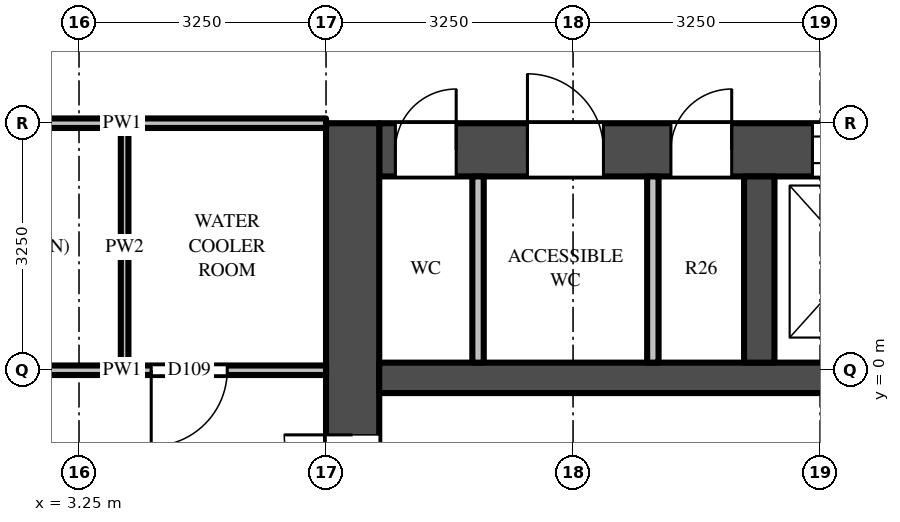
"""IFC4 building model, lengths in metres.
Left out: names, types, materials, properties, quantities, classifications, styles, units other than length and angle.
Written with IfcOpenShell. Run it as: python <this file> out.ifc"""

import sys

from ifc_helpers import new_model, si_unit, direction, frame, frame_2d, origin, place, context, subcontext, project, spatial, rectangle, extrude, source, transform, mapped, element, fill, save


model = new_model("IFC4")
c1 = context("Model", 3, precision=1e-05, world=origin(), true_north=direction((0.0, 1.0)))
c2 = subcontext(c1, "Body", "Model", "MODEL_VIEW")
j1 = project(units=[si_unit("LENGTHUNIT", "METRE"), si_unit("PLANEANGLEUNIT", "RADIAN")], contexts=[c1])
p1 = place(None, origin())
s1 = spatial("IfcSite", under=j1, at=p1, CompositionType="ELEMENT")
p2 = place(p1, origin())
s2 = spatial("IfcBuilding", under=s1, at=p2, CompositionType="ELEMENT")
p3 = place(p2, frame((0.0, 0.0, 302.8)))
s3 = spatial("IfcBuildingStorey", under=s2, at=p3, CompositionType="ELEMENT", Elevation=302.8)
m1 = source(origin(), c2, "Body", "SweptSolid", [
    extrude(rectangle(XDim=14.85, YDim=0.7, at=frame_2d((7.425, 0.0))), origin(), (0.0, 0.0, 1.0), 3.7),
])
p4 = place(p3, frame((7.2, 2.9, 0.0), z_axis=(0.0, 0.0, 1.0), x_axis=(1.0, 0.0, 0.0)))
e1 = element("IfcWall", 1, at=p4, inside=s3, PredefinedType="SHEAR", context=c2, shape_type="MappedRepresentation", body=[
    mapped(m1, transform((0.0, 0.0, 0.0))),
])
m2 = source(origin(), c2, "Body", "SweptSolid", [
    extrude(rectangle(XDim=1.2, YDim=2.1, at=frame_2d((0.6, 1.05))), frame((0.0, 0.36, 0.0), z_axis=(0.0, -1.0, 0.0), x_axis=(1.0, 0.0, 0.0)), (0.0, 0.0, 1.0), 0.72),
])
p5 = place(p4, frame((5.7, 0.0, 0.0)))
e2 = element("IfcOpeningElement", 2, at=p5, cuts=e1, PredefinedType="OPENING", context=c2, shape_type="MappedRepresentation", body=[
    mapped(m2, transform((0.0, 0.0, 0.0))),
])
m3 = source(origin(), c2, "Body", "SweptSolid", [
    extrude(rectangle(XDim=1.3, YDim=2.1, at=frame_2d((0.65, 1.05))), frame((0.0, 0.36, 0.0), z_axis=(0.0, -1.0, 0.0), x_axis=(1.0, 0.0, 0.0)), (0.0, 0.0, 1.0), 0.72),
])
p6 = place(p4, frame((12.2, 0.0, 0.0)))
e3 = element("IfcOpeningElement", 3, at=p6, cuts=e1, PredefinedType="OPENING", context=c2, shape_type="MappedRepresentation", body=[
    mapped(m3, transform((0.0, 0.0, 0.0))),
])
p7 = place(p4, frame((9.85, 0.0, 0.0)))
e4 = element("IfcOpeningElement", 4, at=p7, cuts=e1, PredefinedType="OPENING", context=c2, shape_type="MappedRepresentation", body=[
    mapped(m2, transform((0.0, 0.0, 0.0))),
])
m4 = source(origin(), c2, "Body", "SweptSolid", [
    extrude(rectangle(XDim=1.0, YDim=2.1, at=frame_2d((0.5, 1.05))), frame((0.0, 0.36, 0.0), z_axis=(0.0, -1.0, 0.0), x_axis=(1.0, 0.0, 0.0)), (0.0, 0.0, 1.0), 0.72),
])
p8 = place(p4, frame((7.9, 0.0, 0.0)))
e5 = element("IfcOpeningElement", 5, at=p8, cuts=e1, PredefinedType="OPENING", context=c2, shape_type="MappedRepresentation", body=[
    mapped(m4, transform((0.0, 0.0, 0.0))),
])
m5 = source(origin(), c2, "Body", "SweptSolid", [
    extrude(rectangle(XDim=0.8, YDim=2.1, at=frame_2d((0.4, 1.05))), frame((0.0, 0.36, 0.0), z_axis=(0.0, -1.0, 0.0), x_axis=(1.0, 0.0, 0.0)), (0.0, 0.0, 1.0), 0.72),
])
p9 = place(p4, frame((0.212, 0.0, 0.0)))
e6 = element("IfcOpeningElement", 6, at=p9, cuts=e1, PredefinedType="OPENING", context=c2, shape_type="MappedRepresentation", body=[
    mapped(m5, transform((0.0, 0.0, 0.0))),
])
p10 = place(p4, frame((1.95, 0.0, 0.0)))
e7 = element("IfcOpeningElement", 7, at=p10, cuts=e1, PredefinedType="OPENING", context=c2, shape_type="MappedRepresentation", body=[
    mapped(m4, transform((0.0, 0.0, 0.0))),
])
p11 = place(p4, frame((3.837, 0.0, 0.0)))
e8 = element("IfcOpeningElement", 8, at=p11, cuts=e1, PredefinedType="OPENING", context=c2, shape_type="MappedRepresentation", body=[
    mapped(m5, transform((0.0, 0.0, 0.0))),
])
m6 = source(origin(), c2, "Body", "SweptSolid", [
    extrude(rectangle(XDim=9.05, YDim=0.7, at=frame_2d((4.525, 0.0))), origin(), (0.0, 0.0, 1.0), 3.7),
])
p12 = place(p3, frame((6.85, -5.8, 0.0), z_axis=(0.0, 0.0, 1.0), x_axis=(0.0, 1.0, 0.0)))
e9 = element("IfcWall", 9, at=p12, inside=s3, PredefinedType="SHEAR", context=c2, shape_type="MappedRepresentation", body=[
    mapped(m6, transform((0.0, 0.0, 0.0))),
])
m7 = source(origin(), c2, "Body", "SweptSolid", [
    extrude(rectangle(XDim=1.8, YDim=2.1, at=frame_2d((0.9, 1.05))), frame((0.0, 0.36, 0.0), z_axis=(0.0, -1.0, 0.0), x_axis=(1.0, 0.0, 0.0)), (0.0, 0.0, 1.0), 0.72),
])
p13 = place(p12, frame((3.15, 0.0, 0.0)))
e10 = element("IfcOpeningElement", 10, at=p13, cuts=e9, PredefinedType="OPENING", context=c2, shape_type="MappedRepresentation", body=[
    mapped(m7, transform((0.0, 0.0, 0.0))),
])
m8 = source(origin(), c2, "Body", "SweptSolid", [
    extrude(rectangle(XDim=14.85, YDim=0.4, at=frame_2d((7.425, 0.0))), origin(), (0.0, 0.0, 1.0), 3.7),
])
p14 = place(p3, frame((7.2, -0.1, 0.0), z_axis=(0.0, 0.0, 1.0), x_axis=(1.0, 0.0, 0.0)))
e11 = element("IfcWall", 11, at=p14, inside=s3, PredefinedType="SHEAR", context=c2, shape_type="MappedRepresentation", body=[
    mapped(m8, transform((0.0, 0.0, 0.0))),
])
m9 = source(origin(), c2, "Body", "SweptSolid", [
    extrude(rectangle(XDim=1.0, YDim=2.1, at=frame_2d((0.5, 1.05))), frame((0.0, 0.21, 0.0), z_axis=(0.0, -1.0, 0.0), x_axis=(1.0, 0.0, 0.0)), (0.0, 0.0, 1.0), 0.42),
])
p15 = place(p14, frame((7.9, 0.0, 0.0)))
e12 = element("IfcOpeningElement", 12, at=p15, cuts=e11, PredefinedType="OPENING", context=c2, shape_type="MappedRepresentation", body=[
    mapped(m9, transform((0.0, 0.0, 0.0))),
])
m10 = source(origin(), c2, "Body", "SweptSolid", [
    extrude(rectangle(XDim=2.45, YDim=0.4, at=frame_2d((1.225, 0.0))), origin(), (0.0, 0.0, 1.0), 3.7),
])
p16 = place(p3, frame((12.2, 0.1, 0.0), z_axis=(0.0, 0.0, 1.0), x_axis=(0.0, 1.0, 0.0)))
e13 = element("IfcWall", 13, at=p16, inside=s3, PredefinedType="SHEAR", context=c2, shape_type="MappedRepresentation", body=[
    mapped(m10, transform((0.0, 0.0, 0.0))),
])
m11 = source(origin(), c2, "Body", "SweptSolid", [
    extrude(rectangle(XDim=2.45, YDim=0.15, at=frame_2d((1.225, 0.0))), origin(), (0.0, 0.0, 1.0), 3.7),
])
for number, where, z_axis, x_axis in (
    (14, (8.5, 0.1, 0.0), (0.0, 0.0, 1.0), (0.0, 1.0, 0.0)),
    (15, (10.8, 0.1, 0.0), (0.0, 0.0, 1.0), (0.0, 1.0, 0.0)),
):
    element("IfcWall", number, at=place(p3, frame(where, z_axis=z_axis, x_axis=x_axis)), inside=s3, PredefinedType="PARTITIONING", context=c2, shape_type="MappedRepresentation", body=[
        mapped(m11, transform((0.0, 0.0, 0.0))),
    ])
m12 = source(origin(), c2, "Body", "SweptSolid", [
    extrude(rectangle(XDim=3.125, YDim=0.1, at=frame_2d((1.562, 0.0))), origin(), (0.0, 0.0, 1.0), 3.068),
])
p17 = place(p3, frame((3.85, 0.062, 0.0), z_axis=(0.0, 0.0, 1.0), x_axis=(0.0, 1.0, 0.0)))
e16 = element("IfcWall", 16, at=p17, inside=s3, PredefinedType="PARTITIONING", context=c2, shape_type="MappedRepresentation", body=[
    mapped(m12, transform((0.0, 0.0, 0.0))),
])
m13 = source(origin(), c2, "Body", "SweptSolid", [
    extrude(rectangle(XDim=5.363, YDim=0.125, at=frame_2d((2.681, 0.0))), origin(), (0.0, 0.0, 1.0), 2.997),
])
p18 = place(p3, frame((6.5, 0.0, 0.0), z_axis=(0.0, 0.0, 1.0), x_axis=(-1.0, 0.0, 0.0)))
e17 = element("IfcWall", 17, at=p18, inside=s3, PredefinedType="PARTITIONING", context=c2, shape_type="MappedRepresentation", body=[
    mapped(m13, transform((0.0, 0.0, 0.0))),
])
m14 = source(origin(), c2, "Body", "SweptSolid", [
    extrude(rectangle(XDim=1.0, YDim=2.1, at=frame_2d((0.5, 1.05))), frame((0.0, 0.073, 0.0), z_axis=(0.0, -1.0, 0.0), x_axis=(1.0, 0.0, 0.0)), (0.0, 0.0, 1.0), 0.145),
])
p19 = place(p18, frame((1.3, 0.0, 0.0)))
e18 = element("IfcOpeningElement", 18, at=p19, cuts=e17, PredefinedType="OPENING", context=c2, shape_type="MappedRepresentation", body=[
    mapped(m14, transform((0.0, 0.0, 0.0))),
])
p20 = place(p3, frame((1.137, 3.25, 0.0), z_axis=(0.0, 0.0, 1.0), x_axis=(1.0, 0.0, 0.0)))
e19 = element("IfcWall", 19, at=p20, inside=s3, PredefinedType="PARTITIONING", context=c2, shape_type="MappedRepresentation", body=[
    mapped(m13, transform((0.0, 0.0, 0.0))),
])
m15 = source(origin(), c2, "Body", "SweptSolid", [
    extrude(rectangle(XDim=1.2, YDim=2.1, at=frame_2d((0.6, 1.05))), frame((0.0, -0.275, 0.0), z_axis=(0.0, -1.0, 0.0), x_axis=(1.0, 0.0, 0.0)), (0.0, 0.0, 1.0), 0.05),
])
p21 = place(p5, origin())
e20 = element("IfcDoor", 20, at=p21, inside=s3, OperationType="DOUBLE_DOOR_SLIDING", PredefinedType="DOOR", context=c2, shape_type="MappedRepresentation", body=[
    mapped(m15, transform((0.0, 0.0, 0.0))),
])
fill(e2, e20)
m16 = source(origin(), c2, "Body", "SweptSolid", [
    extrude(rectangle(XDim=1.8, YDim=2.1, at=frame_2d((0.9, 1.05))), frame((0.0, -0.275, 0.0), z_axis=(0.0, -1.0, 0.0), x_axis=(1.0, 0.0, 0.0)), (0.0, 0.0, 1.0), 0.05),
])
p22 = place(p13, origin())
e21 = element("IfcDoor", 21, at=p22, inside=s3, OperationType="DOUBLE_DOOR_SINGLE_SWING", PredefinedType="DOOR", context=c2, shape_type="MappedRepresentation", body=[
    mapped(m16, transform((0.0, 0.0, 0.0))),
])
fill(e10, e21)
m17 = source(origin(), c2, "Body", "SweptSolid", [
    extrude(rectangle(XDim=0.8, YDim=2.1, at=frame_2d((0.4, 1.05))), frame((0.0, -0.275, 0.0), z_axis=(0.0, -1.0, 0.0), x_axis=(1.0, 0.0, 0.0)), (0.0, 0.0, 1.0), 0.05),
])
p23 = place(p9, origin())
e22 = element("IfcDoor", 22, at=p23, inside=s3, OperationType="SINGLE_SWING_RIGHT", PredefinedType="DOOR", context=c2, shape_type="MappedRepresentation", body=[
    mapped(m17, transform((0.0, 0.0, 0.0))),
])
fill(e6, e22)
m18 = source(origin(), c2, "Body", "SweptSolid", [
    extrude(rectangle(XDim=1.0, YDim=2.1, at=frame_2d((0.5, 1.05))), frame((0.0, -0.275, 0.0), z_axis=(0.0, -1.0, 0.0), x_axis=(1.0, 0.0, 0.0)), (0.0, 0.0, 1.0), 0.05),
])
p24 = place(p10, origin())
e23 = element("IfcDoor", 23, at=p24, inside=s3, OperationType="SINGLE_SWING_LEFT", PredefinedType="DOOR", context=c2, shape_type="MappedRepresentation", body=[
    mapped(m18, transform((0.0, 0.0, 0.0))),
])
fill(e7, e23)
p25 = place(p11, origin())
e24 = element("IfcDoor", 24, at=p25, inside=s3, OperationType="SINGLE_SWING_RIGHT", PredefinedType="DOOR", context=c2, shape_type="MappedRepresentation", body=[
    mapped(m17, transform((0.0, 0.0, 0.0))),
])
fill(e8, e24)
m19 = source(origin(), c2, "Body", "SweptSolid", [
    extrude(rectangle(XDim=1.0, YDim=2.1, at=frame_2d((0.5, 1.05))), frame((0.0, 0.025, 0.0), z_axis=(0.0, -1.0, 0.0), x_axis=(1.0, 0.0, 0.0)), (0.0, 0.0, 1.0), 0.05),
])
p26 = place(p19, origin())
e25 = element("IfcDoor", 25, at=p26, inside=s3, OperationType="SINGLE_SWING_RIGHT", PredefinedType="DOOR", context=c2, shape_type="MappedRepresentation", body=[
    mapped(m19, transform((0.0, 0.0, 0.0))),
])
fill(e18, e25)
save(model, sys.argv[1])
